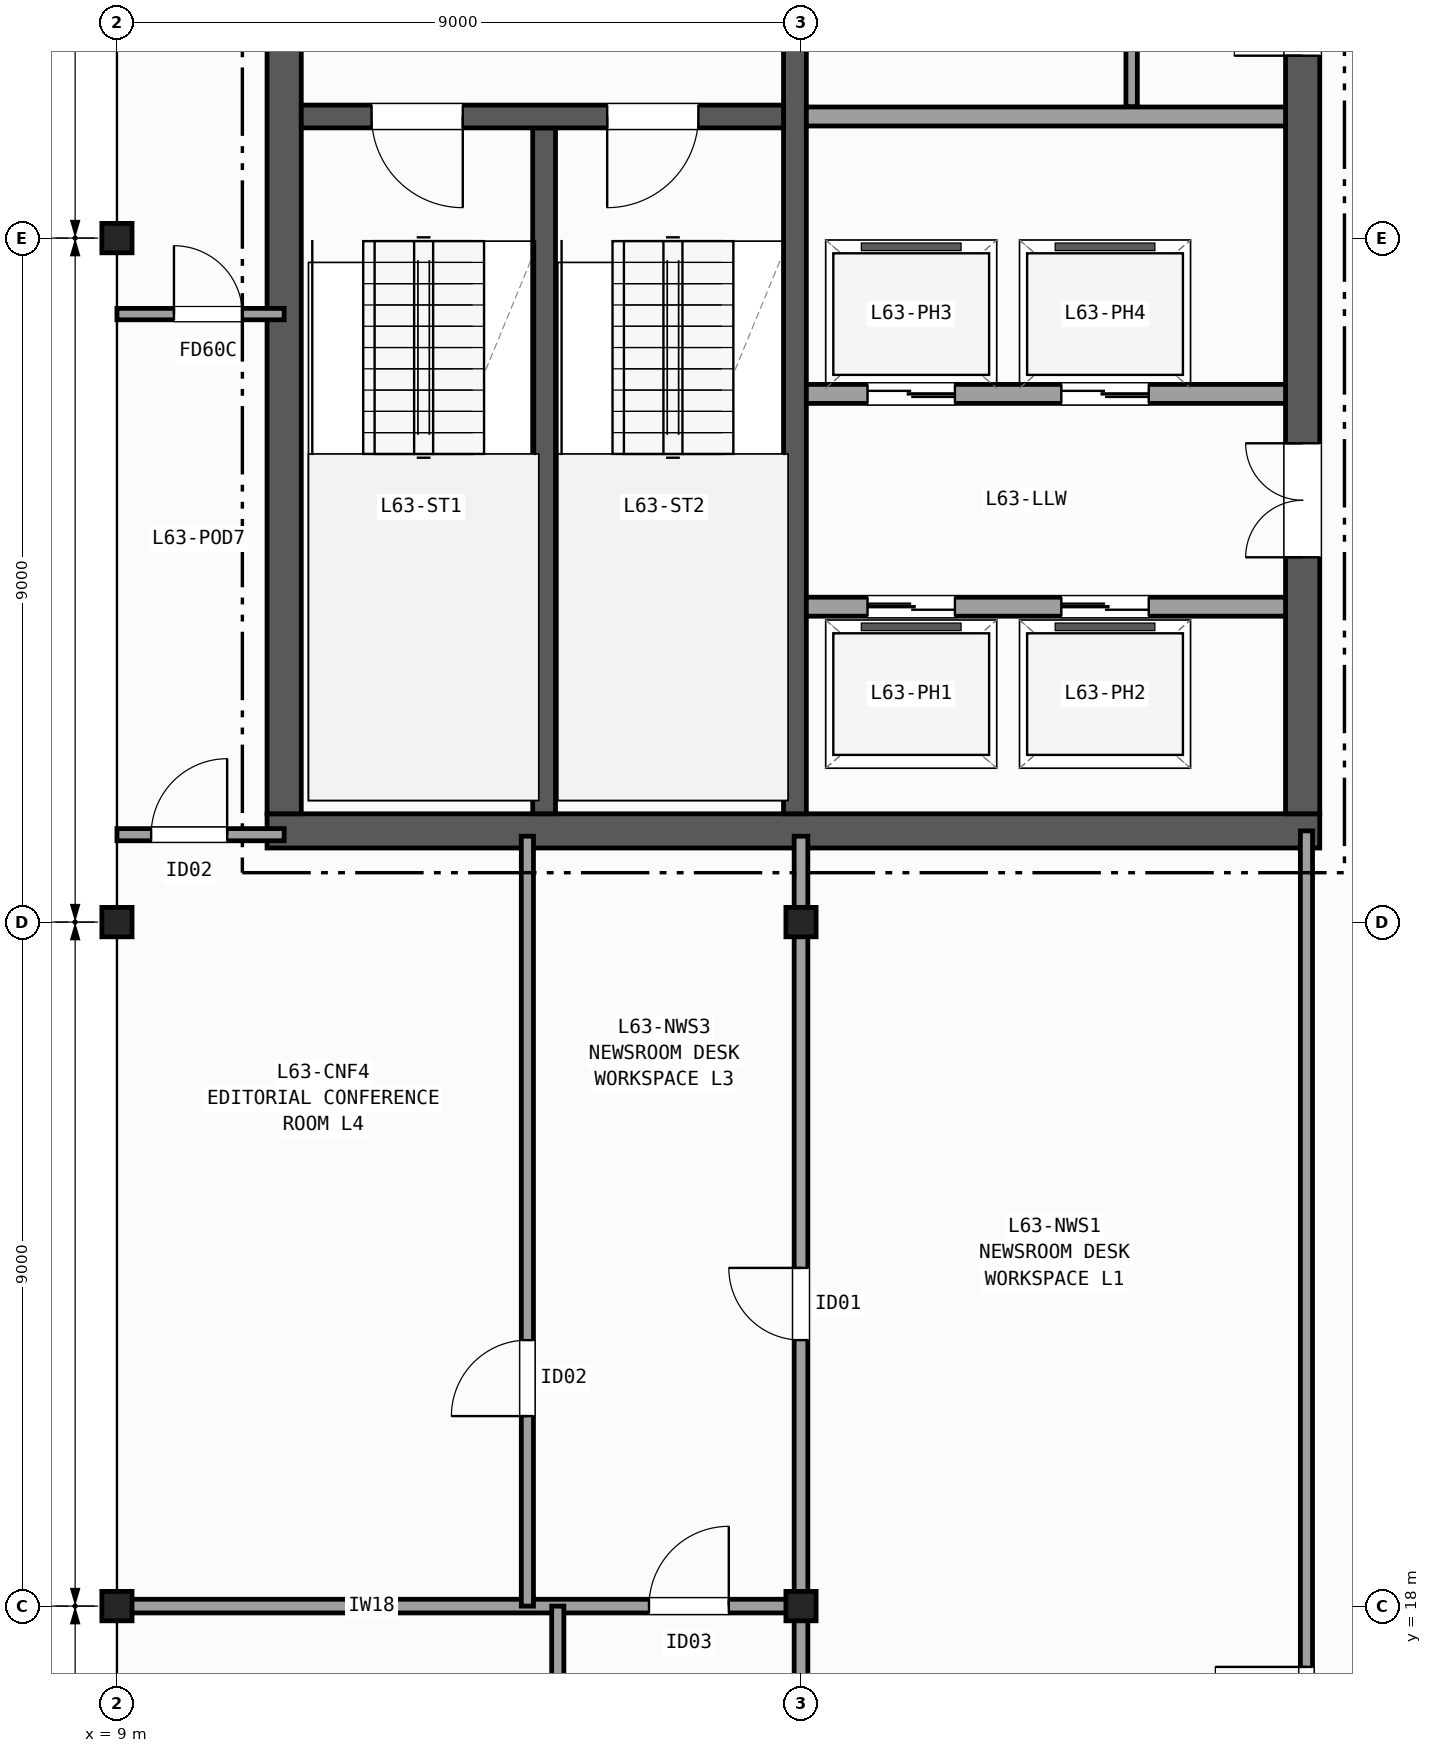
"""IFC4 building model, lengths in metres.
Left out: names, types, materials, properties, quantities, classifications, styles, units other than length and angle.
Written with IfcOpenShell. Run it as: python <this file> out.ifc"""

import sys

from ifc_helpers import new_model, si_unit, direction, frame, frame_2d, origin, origin_2d, place, context, subcontext, project, spatial, rectangle, i_section, extrude, element, fill, save


model = new_model("IFC4")
c1 = context("Model", 3, precision=1e-05, world=origin(), true_north=direction((0.0, 1.0)))
c2 = subcontext(c1, "Body", "Model", "MODEL_VIEW")
j1 = project(units=[si_unit("LENGTHUNIT", "METRE"), si_unit("PLANEANGLEUNIT", "RADIAN")], contexts=[c1])
p1 = place(None, origin())
s1 = spatial("IfcSite", under=j1, at=p1, CompositionType="ELEMENT")
p2 = place(p1, origin())
s2 = spatial("IfcBuilding", under=s1, at=p2, CompositionType="ELEMENT")
p3 = place(p2, frame((0.0, 0.0, 251.9)))
s3 = spatial("IfcBuildingStorey", under=s2, at=p3, CompositionType="ELEMENT", Elevation=251.9)
for number, where, z_axis, x_axis in (
    (1, (9.0, 18.0, 0.0), (0.0, 0.0, 1.0), (1.0, 0.0, 0.0)),
    (2, (9.0, 27.0, 0.0), (0.0, 0.0, 1.0), (1.0, 0.0, 0.0)),
    (3, (9.0, 36.0, 0.0), (0.0, 0.0, 1.0), (1.0, 0.0, 0.0)),
    (4, (18.0, 18.0, 0.0), (0.0, 0.0, 1.0), (1.0, 0.0, 0.0)),
    (5, (18.0, 27.0, 0.0), (0.0, 0.0, 1.0), (1.0, 0.0, 0.0)),
):
    element("IfcColumn", number, at=place(p3, frame(where, z_axis=z_axis, x_axis=x_axis)), inside=s3, PredefinedType="COLUMN", context=c2, shape_type="SweptSolid", body=[
        extrude(i_section(OverallWidth=0.397, OverallDepth=0.387, WebThickness=0.021, FlangeThickness=0.033, FilletRadius=0.015, at=origin_2d()), origin(), (0.0, 0.0, 1.0), 3.7),
    ])
p4 = place(p3, frame((10.975, 28.2, 0.0), z_axis=(0.0, 0.0, 1.0), x_axis=(1.0, 0.0, 0.0)))
e6 = element("IfcWall", 6, at=p4, inside=s3, PredefinedType="SHEAR", context=c2, shape_type="SweptSolid", body=[
    extrude(rectangle(XDim=13.85, YDim=0.45, at=frame_2d((6.925, 0.0))), origin(), (0.0, 0.0, 1.0), 3.42),
])
p5 = place(p3, frame((11.2, 42.175, 0.0), z_axis=(0.0, 0.0, 1.0), x_axis=(0.0, -1.0, 0.0)))
e7 = element("IfcWall", 7, at=p5, inside=s3, PredefinedType="SHEAR", context=c2, shape_type="SweptSolid", body=[
    extrude(rectangle(XDim=13.75, YDim=0.45, at=frame_2d((6.875, 0.0))), origin(), (0.0, 0.0, 1.0), 3.42),
])
p6 = place(p3, frame((24.6, 28.425, 0.0), z_axis=(0.0, 0.0, 1.0), x_axis=(0.0, 1.0, 0.0)))
e8 = element("IfcWall", 8, at=p6, inside=s3, PredefinedType="SHEAR", context=c2, shape_type="SweptSolid", body=[
    extrude(rectangle(XDim=13.75, YDim=0.45, at=frame_2d((6.875, 0.0))), origin(), (0.0, 0.0, 1.0), 3.42),
])
p7 = place(p6, frame((3.375, 0.0, 0.0)))
e9 = element("IfcOpeningElement", 9, at=p7, cuts=e8, PredefinedType="OPENING", context=c2, shape_type="SweptSolid", body=[
    extrude(rectangle(XDim=1.5, YDim=2.2, at=frame_2d((0.75, 1.1))), frame((0.0, 0.235, 0.0), z_axis=(0.0, -1.0, 0.0), x_axis=(1.0, 0.0, 0.0)), (0.0, 0.0, 1.0), 0.47),
])
p8 = place(p6, frame((9.975, 0.0, 0.0)))
e10 = element("IfcOpeningElement", 10, at=p8, cuts=e8, PredefinedType="OPENING", context=c2, shape_type="SweptSolid", body=[
    extrude(rectangle(XDim=0.9, YDim=2.1, at=frame_2d((0.45, 1.05))), frame((0.0, 0.235, 0.0), z_axis=(0.0, -1.0, 0.0), x_axis=(1.0, 0.0, 0.0)), (0.0, 0.0, 1.0), 0.47),
])
p9 = place(p6, frame((12.075, 0.0, 0.0)))
e11 = element("IfcOpeningElement", 11, at=p9, cuts=e8, PredefinedType="OPENING", context=c2, shape_type="SweptSolid", body=[
    extrude(rectangle(XDim=0.9, YDim=2.1, at=frame_2d((0.45, 1.05))), frame((0.0, 0.235, 0.0), z_axis=(0.0, -1.0, 0.0), x_axis=(1.0, 0.0, 0.0)), (0.0, 0.0, 1.0), 0.47),
])
p10 = place(p3, frame((14.62, 28.425, 0.0), z_axis=(0.0, 0.0, 1.0), x_axis=(0.0, 1.0, 0.0)))
e12 = element("IfcWall", 12, at=p10, inside=s3, PredefinedType="SHEAR", context=c2, shape_type="SweptSolid", body=[
    extrude(rectangle(XDim=9.025, YDim=0.3, at=frame_2d((4.512, 0.0))), origin(), (0.0, 0.0, 1.0), 3.42),
])
p11 = place(p3, frame((17.92, 42.175, 0.0), z_axis=(0.0, 0.0, 1.0), x_axis=(0.0, -1.0, 0.0)))
e13 = element("IfcWall", 13, at=p11, inside=s3, PredefinedType="SHEAR", context=c2, shape_type="SweptSolid", body=[
    extrude(rectangle(XDim=13.75, YDim=0.3, at=frame_2d((6.875, 0.0))), origin(), (0.0, 0.0, 1.0), 3.42),
])
p12 = place(p11, frame((2.0, 0.0, 0.0)))
e14 = element("IfcOpeningElement", 14, at=p12, cuts=e13, PredefinedType="OPENING", context=c2, shape_type="SweptSolid", body=[
    extrude(rectangle(XDim=1.15, YDim=2.15, at=frame_2d((0.575, 1.075))), frame((0.0, 0.16, 0.0), z_axis=(0.0, -1.0, 0.0), x_axis=(1.0, 0.0, 0.0)), (0.0, 0.0, 1.0), 0.32),
])
p13 = place(p3, frame((17.77, 37.6, 0.0), z_axis=(0.0, 0.0, 1.0), x_axis=(-1.0, 0.0, 0.0)))
e15 = element("IfcWall", 15, at=p13, inside=s3, PredefinedType="SHEAR", context=c2, shape_type="SweptSolid", body=[
    extrude(rectangle(XDim=6.345, YDim=0.3, at=frame_2d((3.172, 0.0))), origin(), (0.0, 0.0, 1.0), 3.42),
])
p14 = place(p13, frame((4.22, 0.0, 0.0)))
e16 = element("IfcOpeningElement", 16, at=p14, cuts=e15, PredefinedType="OPENING", context=c2, shape_type="SweptSolid", body=[
    extrude(rectangle(XDim=1.2, YDim=2.15, at=frame_2d((0.6, 1.075))), frame((0.0, 0.16, 0.0), z_axis=(0.0, -1.0, 0.0), x_axis=(1.0, 0.0, 0.0)), (0.0, 0.0, 1.0), 0.32),
])
p15 = place(p13, frame((1.12, 0.0, 0.0)))
e17 = element("IfcOpeningElement", 17, at=p15, cuts=e15, PredefinedType="OPENING", context=c2, shape_type="SweptSolid", body=[
    extrude(rectangle(XDim=1.2, YDim=2.15, at=frame_2d((0.6, 1.075))), frame((0.0, 0.16, 0.0), z_axis=(0.0, -1.0, 0.0), x_axis=(1.0, 0.0, 0.0)), (0.0, 0.0, 1.0), 0.32),
])
p16 = place(p3, frame((18.07, 37.6, 0.0), z_axis=(0.0, 0.0, 1.0), x_axis=(1.0, 0.0, 0.0)))
e18 = element("IfcWall", 18, at=p16, inside=s3, PredefinedType="PARTITIONING", context=c2, shape_type="SweptSolid", body=[
    extrude(rectangle(XDim=6.305, YDim=0.25, at=frame_2d((3.152, 0.0))), origin(), (0.0, 0.0, 1.0), 3.42),
])
p17 = place(p3, frame((18.07, 31.15, 0.0), z_axis=(0.0, 0.0, 1.0), x_axis=(1.0, 0.0, 0.0)))
e19 = element("IfcWall", 19, at=p17, inside=s3, PredefinedType="PARTITIONING", context=c2, shape_type="SweptSolid", body=[
    extrude(rectangle(XDim=6.305, YDim=0.25, at=frame_2d((3.152, 0.0))), origin(), (0.0, 0.0, 1.0), 3.42),
])
p18 = place(p17, frame((0.805, 0.0, 0.0)))
e20 = element("IfcOpeningElement", 20, at=p18, cuts=e19, PredefinedType="OPENING", context=c2, shape_type="SweptSolid", body=[
    extrude(rectangle(XDim=1.15, YDim=2.15, at=frame_2d((0.575, 1.075))), frame((0.0, 0.135, 0.0), z_axis=(0.0, -1.0, 0.0), x_axis=(1.0, 0.0, 0.0)), (0.0, 0.0, 1.0), 0.27),
])
p19 = place(p17, frame((3.355, 0.0, 0.0)))
e21 = element("IfcOpeningElement", 21, at=p19, cuts=e19, PredefinedType="OPENING", context=c2, shape_type="SweptSolid", body=[
    extrude(rectangle(XDim=1.15, YDim=2.15, at=frame_2d((0.575, 1.075))), frame((0.0, 0.135, 0.0), z_axis=(0.0, -1.0, 0.0), x_axis=(1.0, 0.0, 0.0)), (0.0, 0.0, 1.0), 0.27),
])
p20 = place(p3, frame((24.375, 33.95, 0.0), z_axis=(0.0, 0.0, 1.0), x_axis=(-1.0, 0.0, 0.0)))
e22 = element("IfcWall", 22, at=p20, inside=s3, PredefinedType="PARTITIONING", context=c2, shape_type="SweptSolid", body=[
    extrude(rectangle(XDim=6.305, YDim=0.25, at=frame_2d((3.152, 0.0))), origin(), (0.0, 0.0, 1.0), 3.42),
])
p21 = place(p20, frame((4.35, 0.0, 0.0)))
e23 = element("IfcOpeningElement", 23, at=p21, cuts=e22, PredefinedType="OPENING", context=c2, shape_type="SweptSolid", body=[
    extrude(rectangle(XDim=1.15, YDim=2.15, at=frame_2d((0.575, 1.075))), frame((0.0, 0.135, 0.0), z_axis=(0.0, -1.0, 0.0), x_axis=(1.0, 0.0, 0.0)), (0.0, 0.0, 1.0), 0.27),
])
p22 = place(p20, frame((1.8, 0.0, 0.0)))
e24 = element("IfcOpeningElement", 24, at=p22, cuts=e22, PredefinedType="OPENING", context=c2, shape_type="SweptSolid", body=[
    extrude(rectangle(XDim=1.15, YDim=2.15, at=frame_2d((0.575, 1.075))), frame((0.0, 0.135, 0.0), z_axis=(0.0, -1.0, 0.0), x_axis=(1.0, 0.0, 0.0)), (0.0, 0.0, 1.0), 0.27),
])
p23 = place(p3, frame((22.35, 37.73, 0.0), z_axis=(0.0, 0.0, 1.0), x_axis=(0.0, 1.0, 0.0)))
e25 = element("IfcWall", 25, at=p23, inside=s3, PredefinedType="PARTITIONING", context=c2, shape_type="SweptSolid", body=[
    extrude(rectangle(XDim=4.445, YDim=0.15, at=frame_2d((2.223, 0.0))), origin(), (0.0, 0.0, 1.0), 3.42),
])
p24 = place(p3, frame((9.0, 28.15, 0.0), z_axis=(0.0, 0.0, 1.0), x_axis=(1.0, 0.0, 0.0)))
e26 = element("IfcWall", 26, at=p24, inside=s3, PredefinedType="PARTITIONING", context=c2, shape_type="SweptSolid", body=[
    extrude(rectangle(XDim=2.2, YDim=0.16, at=frame_2d((1.1, 0.0))), origin(), (0.0, 0.0, 1.0), 2.707),
])
p25 = place(p24, frame((0.45, 0.0, 0.0)))
e27 = element("IfcOpeningElement", 27, at=p25, cuts=e26, PredefinedType="OPENING", context=c2, shape_type="SweptSolid", body=[
    extrude(rectangle(XDim=1.0, YDim=2.1, at=frame_2d((0.5, 1.05))), frame((0.0, 0.09, 0.0), z_axis=(0.0, -1.0, 0.0), x_axis=(1.0, 0.0, 0.0)), (0.0, 0.0, 1.0), 0.18),
])
p26 = place(p3, frame((9.0, 35.0, 0.0), z_axis=(0.0, 0.0, 1.0), x_axis=(1.0, 0.0, 0.0)))
e28 = element("IfcWall", 28, at=p26, inside=s3, PredefinedType="PARTITIONING", context=c2, shape_type="SweptSolid", body=[
    extrude(rectangle(XDim=2.2, YDim=0.15, at=frame_2d((1.1, 0.0))), origin(), (0.0, 0.0, 1.0), 2.707),
])
p27 = place(p26, frame((0.75, 0.0, 0.0)))
e29 = element("IfcOpeningElement", 29, at=p27, cuts=e28, PredefinedType="OPENING", context=c2, shape_type="SweptSolid", body=[
    extrude(rectangle(XDim=0.9, YDim=2.1, at=frame_2d((0.45, 1.05))), frame((0.0, 0.085, 0.0), z_axis=(0.0, -1.0, 0.0), x_axis=(1.0, 0.0, 0.0)), (0.0, 0.0, 1.0), 0.17),
])
p28 = place(p3, frame((24.65, 9.0, 0.0), z_axis=(0.0, 0.0, 1.0), x_axis=(0.0, 1.0, 0.0)))
e30 = element("IfcWall", 30, at=p28, inside=s3, PredefinedType="PARTITIONING", context=c2, shape_type="SweptSolid", body=[
    extrude(rectangle(XDim=19.2, YDim=0.16, at=frame_2d((9.6, 0.0))), origin(), (0.0, 0.0, 1.0), 2.707),
])
p29 = place(p28, frame((7.0, 0.0, 0.0)))
e31 = element("IfcOpeningElement", 31, at=p29, cuts=e30, PredefinedType="OPENING", context=c2, shape_type="SweptSolid", body=[
    extrude(rectangle(XDim=1.2, YDim=2.15, at=frame_2d((0.6, 1.075))), frame((0.0, 0.09, 0.0), z_axis=(0.0, -1.0, 0.0), x_axis=(1.0, 0.0, 0.0)), (0.0, 0.0, 1.0), 0.18),
])
p30 = place(p28, frame((2.55, 0.0, 0.0)))
e32 = element("IfcOpeningElement", 32, at=p30, cuts=e30, PredefinedType="OPENING", context=c2, shape_type="SweptSolid", body=[
    extrude(rectangle(XDim=0.86, YDim=2.05, at=frame_2d((0.43, 1.025))), frame((0.0, 0.09, 0.0), z_axis=(0.0, -1.0, 0.0), x_axis=(1.0, 0.0, 0.0)), (0.0, 0.0, 1.0), 0.18),
])
p31 = place(p3, frame((9.0, 18.0, 0.0), z_axis=(0.0, 0.0, 1.0), x_axis=(1.0, 0.0, 0.0)))
e33 = element("IfcWall", 33, at=p31, inside=s3, PredefinedType="PARTITIONING", context=c2, shape_type="SweptSolid", body=[
    extrude(rectangle(XDim=9.08, YDim=0.18, at=frame_2d((4.54, 0.0))), origin(), (0.0, 0.0, 1.0), 2.707),
])
p32 = place(p31, frame((7.0, 0.0, 0.0)))
e34 = element("IfcOpeningElement", 34, at=p32, cuts=e33, PredefinedType="OPENING", context=c2, shape_type="SweptSolid", body=[
    extrude(rectangle(XDim=1.05, YDim=2.15, at=frame_2d((0.525, 1.075))), frame((0.0, 0.1, 0.0), z_axis=(0.0, -1.0, 0.0), x_axis=(1.0, 0.0, 0.0)), (0.0, 0.0, 1.0), 0.2),
])
p33 = place(p3, frame((18.0, 14.2, 0.0), z_axis=(0.0, 0.0, 1.0), x_axis=(0.0, 1.0, 0.0)))
e35 = element("IfcWall", 35, at=p33, inside=s3, PredefinedType="PARTITIONING", context=c2, shape_type="SweptSolid", body=[
    extrude(rectangle(XDim=13.93, YDim=0.18, at=frame_2d((6.965, 0.0))), origin(), (0.0, 0.0, 1.0), 2.789),
])
p34 = place(p33, frame((7.3, 0.0, 0.0)))
e36 = element("IfcOpeningElement", 36, at=p34, cuts=e35, PredefinedType="OPENING", context=c2, shape_type="SweptSolid", body=[
    extrude(rectangle(XDim=0.95, YDim=2.1, at=frame_2d((0.475, 1.05))), frame((0.0, 0.1, 0.0), z_axis=(0.0, -1.0, 0.0), x_axis=(1.0, 0.0, 0.0)), (0.0, 0.0, 1.0), 0.2),
])
p35 = place(p3, frame((14.4, 18.0, 0.0), z_axis=(0.0, 0.0, 1.0), x_axis=(0.0, 1.0, 0.0)))
e37 = element("IfcWall", 37, at=p35, inside=s3, PredefinedType="PARTITIONING", context=c2, shape_type="SweptSolid", body=[
    extrude(rectangle(XDim=10.13, YDim=0.16, at=frame_2d((5.065, 0.0))), origin(), (0.0, 0.0, 1.0), 2.789),
])
p36 = place(p35, frame((2.5, 0.0, 0.0)))
e38 = element("IfcOpeningElement", 38, at=p36, cuts=e37, PredefinedType="OPENING", context=c2, shape_type="SweptSolid", body=[
    extrude(rectangle(XDim=1.0, YDim=2.1, at=frame_2d((0.5, 1.05))), frame((0.0, 0.09, 0.0), z_axis=(0.0, -1.0, 0.0), x_axis=(1.0, 0.0, 0.0)), (0.0, 0.0, 1.0), 0.18),
])
p37 = place(p3, frame((14.8, 9.0, 0.0), z_axis=(0.0, 0.0, 1.0), x_axis=(0.0, 1.0, 0.0)))
e39 = element("IfcWall", 39, at=p37, inside=s3, PredefinedType="PARTITIONING", context=c2, shape_type="SweptSolid", body=[
    extrude(rectangle(XDim=9.0, YDim=0.16, at=frame_2d((4.5, 0.0))), origin(), (0.0, 0.0, 1.0), 2.789),
])
p38 = place(p37, frame((2.5, 0.0, 0.0)))
e40 = element("IfcOpeningElement", 40, at=p38, cuts=e39, PredefinedType="OPENING", context=c2, shape_type="SweptSolid", body=[
    extrude(rectangle(XDim=1.2, YDim=2.15, at=frame_2d((0.6, 1.075))), frame((0.0, 0.09, 0.0), z_axis=(0.0, -1.0, 0.0), x_axis=(1.0, 0.0, 0.0)), (0.0, 0.0, 1.0), 0.18),
])
p39 = place(p14, origin())
e41 = element("IfcDoor", 41, at=p39, inside=s3, OperationType="SINGLE_SWING_LEFT", PredefinedType="DOOR", context=c2, shape_type="SweptSolid", body=[
    extrude(rectangle(XDim=1.2, YDim=2.15, at=frame_2d((0.6, 1.075))), frame((0.0, 0.025, 0.0), z_axis=(0.0, -1.0, 0.0), x_axis=(1.0, 0.0, 0.0)), (0.0, 0.0, 1.0), 0.05),
])
fill(e16, e41)
p40 = place(p15, origin())
e42 = element("IfcDoor", 42, at=p40, inside=s3, OperationType="SINGLE_SWING_RIGHT", PredefinedType="DOOR", context=c2, shape_type="SweptSolid", body=[
    extrude(rectangle(XDim=1.2, YDim=2.15, at=frame_2d((0.6, 1.075))), frame((0.0, 0.025, 0.0), z_axis=(0.0, -1.0, 0.0), x_axis=(1.0, 0.0, 0.0)), (0.0, 0.0, 1.0), 0.05),
])
fill(e17, e42)
p41 = place(p7, origin())
e43 = element("IfcDoor", 43, at=p41, inside=s3, OperationType="DOUBLE_DOOR_SINGLE_SWING", PredefinedType="DOOR", context=c2, shape_type="SweptSolid", body=[
    extrude(rectangle(XDim=1.5, YDim=2.2, at=frame_2d((0.75, 1.1))), frame((0.0, 0.025, 0.0), z_axis=(0.0, -1.0, 0.0), x_axis=(1.0, 0.0, 0.0)), (0.0, 0.0, 1.0), 0.05),
])
fill(e9, e43)
p42 = place(p8, origin())
e44 = element("IfcDoor", 44, at=p42, inside=s3, OperationType="SINGLE_SWING_LEFT", PredefinedType="DOOR", context=c2, shape_type="SweptSolid", body=[
    extrude(rectangle(XDim=0.9, YDim=2.1, at=frame_2d((0.45, 1.05))), frame((0.0, 0.025, 0.0), z_axis=(0.0, -1.0, 0.0), x_axis=(1.0, 0.0, 0.0)), (0.0, 0.0, 1.0), 0.05),
])
fill(e10, e44)
p43 = place(p18, origin())
e45 = element("IfcDoor", 45, at=p43, inside=s3, OperationType="DOUBLE_DOOR_SLIDING", PredefinedType="DOOR", context=c2, shape_type="SweptSolid", body=[
    extrude(rectangle(XDim=1.15, YDim=2.15, at=frame_2d((0.575, 1.075))), frame((0.0, 0.025, 0.0), z_axis=(0.0, -1.0, 0.0), x_axis=(1.0, 0.0, 0.0)), (0.0, 0.0, 1.0), 0.05),
])
fill(e20, e45)
p44 = place(p19, origin())
e46 = element("IfcDoor", 46, at=p44, inside=s3, OperationType="DOUBLE_DOOR_SLIDING", PredefinedType="DOOR", context=c2, shape_type="SweptSolid", body=[
    extrude(rectangle(XDim=1.15, YDim=2.15, at=frame_2d((0.575, 1.075))), frame((0.0, 0.025, 0.0), z_axis=(0.0, -1.0, 0.0), x_axis=(1.0, 0.0, 0.0)), (0.0, 0.0, 1.0), 0.05),
])
fill(e21, e46)
p45 = place(p21, origin())
e47 = element("IfcDoor", 47, at=p45, inside=s3, OperationType="DOUBLE_DOOR_SLIDING", PredefinedType="DOOR", context=c2, shape_type="SweptSolid", body=[
    extrude(rectangle(XDim=1.15, YDim=2.15, at=frame_2d((0.575, 1.075))), frame((0.0, 0.025, 0.0), z_axis=(0.0, -1.0, 0.0), x_axis=(1.0, 0.0, 0.0)), (0.0, 0.0, 1.0), 0.05),
])
fill(e23, e47)
p46 = place(p22, origin())
e48 = element("IfcDoor", 48, at=p46, inside=s3, OperationType="DOUBLE_DOOR_SLIDING", PredefinedType="DOOR", context=c2, shape_type="SweptSolid", body=[
    extrude(rectangle(XDim=1.15, YDim=2.15, at=frame_2d((0.575, 1.075))), frame((0.0, 0.025, 0.0), z_axis=(0.0, -1.0, 0.0), x_axis=(1.0, 0.0, 0.0)), (0.0, 0.0, 1.0), 0.05),
])
fill(e24, e48)
p47 = place(p25, origin())
e49 = element("IfcDoor", 49, at=p47, inside=s3, OperationType="SINGLE_SWING_RIGHT", PredefinedType="DOOR", context=c2, shape_type="SweptSolid", body=[
    extrude(rectangle(XDim=1.0, YDim=2.1, at=frame_2d((0.5, 1.05))), frame((0.0, 0.025, 0.0), z_axis=(0.0, -1.0, 0.0), x_axis=(1.0, 0.0, 0.0)), (0.0, 0.0, 1.0), 0.05),
])
fill(e27, e49)
p48 = place(p27, origin())
e50 = element("IfcDoor", 50, at=p48, inside=s3, OperationType="SINGLE_SWING_LEFT", PredefinedType="DOOR", context=c2, shape_type="SweptSolid", body=[
    extrude(rectangle(XDim=0.9, YDim=2.1, at=frame_2d((0.45, 1.05))), frame((0.0, 0.025, 0.0), z_axis=(0.0, -1.0, 0.0), x_axis=(1.0, 0.0, 0.0)), (0.0, 0.0, 1.0), 0.05),
])
fill(e29, e50)
p49 = place(p29, origin())
e51 = element("IfcDoor", 51, at=p49, inside=s3, OperationType="SINGLE_SWING_RIGHT", PredefinedType="DOOR", context=c2, shape_type="SweptSolid", body=[
    extrude(rectangle(XDim=1.2, YDim=2.15, at=frame_2d((0.6, 1.075))), frame((0.0, 0.025, 0.0), z_axis=(0.0, -1.0, 0.0), x_axis=(1.0, 0.0, 0.0)), (0.0, 0.0, 1.0), 0.05),
])
fill(e31, e51)
p50 = place(p34, origin())
e52 = element("IfcDoor", 52, at=p50, inside=s3, OperationType="SINGLE_SWING_RIGHT", PredefinedType="DOOR", context=c2, shape_type="SweptSolid", body=[
    extrude(rectangle(XDim=0.95, YDim=2.1, at=frame_2d((0.475, 1.05))), frame((0.0, 0.025, 0.0), z_axis=(0.0, -1.0, 0.0), x_axis=(1.0, 0.0, 0.0)), (0.0, 0.0, 1.0), 0.05),
])
fill(e36, e52)
p51 = place(p36, origin())
e53 = element("IfcDoor", 53, at=p51, inside=s3, OperationType="SINGLE_SWING_LEFT", PredefinedType="DOOR", context=c2, shape_type="SweptSolid", body=[
    extrude(rectangle(XDim=1.0, YDim=2.1, at=frame_2d((0.5, 1.05))), frame((0.0, 0.025, 0.0), z_axis=(0.0, -1.0, 0.0), x_axis=(1.0, 0.0, 0.0)), (0.0, 0.0, 1.0), 0.05),
])
fill(e38, e53)
p52 = place(p32, origin())
e54 = element("IfcDoor", 54, at=p52, inside=s3, OperationType="SINGLE_SWING_RIGHT", PredefinedType="DOOR", context=c2, shape_type="SweptSolid", body=[
    extrude(rectangle(XDim=1.05, YDim=2.15, at=frame_2d((0.525, 1.075))), frame((0.0, 0.025, 0.0), z_axis=(0.0, -1.0, 0.0), x_axis=(1.0, 0.0, 0.0)), (0.0, 0.0, 1.0), 0.05),
])
fill(e34, e54)
save(model, sys.argv[1])
